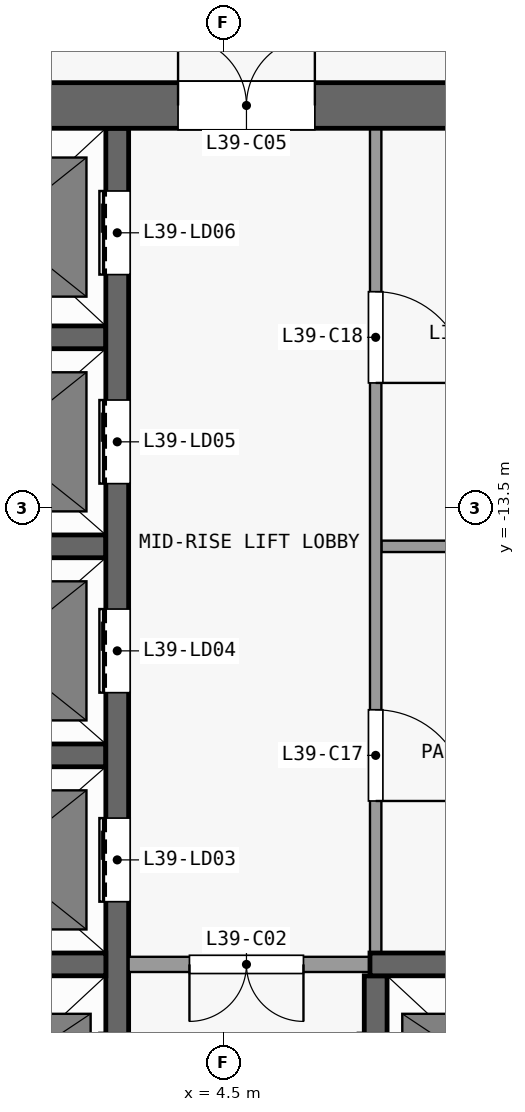
"""IFC4 building model, lengths in metres.
Left out: names, types, materials, properties, quantities, classifications, styles, units other than length and angle.
Written with IfcOpenShell. Run it as: python <this file> out.ifc"""

import sys

from ifc_helpers import new_model, si_unit, direction, frame, frame_2d, origin, place, context, subcontext, project, spatial, rectangle, extrude, element, fill, save


model = new_model("IFC4")
c1 = context("Model", 3, precision=1e-05, world=origin(), true_north=direction((0.0, 1.0)))
c2 = subcontext(c1, "Body", "Model", "MODEL_VIEW")
j1 = project(units=[si_unit("LENGTHUNIT", "METRE"), si_unit("PLANEANGLEUNIT", "RADIAN")], contexts=[c1])
p1 = place(None, origin())
s1 = spatial("IfcSite", under=j1, at=p1, CompositionType="ELEMENT")
p2 = place(p1, origin())
s2 = spatial("IfcBuilding", under=s1, at=p2, CompositionType="ELEMENT")
p3 = place(p2, frame((0.0, 0.0, 160.1)))
s3 = spatial("IfcBuildingStorey", under=s2, at=p3, CompositionType="ELEMENT", Elevation=160.1)
p4 = place(p3, frame((-13.3, -8.2, 0.0), z_axis=(0.0, 0.0, 1.0), x_axis=(1.0, 0.0, 0.0)))
e1 = element("IfcWall", 1, at=p4, inside=s3, PredefinedType="SHEAR", context=c2, shape_type="SweptSolid", body=[
    extrude(rectangle(XDim=26.6, YDim=0.6, at=frame_2d((13.3, 0.0))), origin(), (0.0, 0.0, 1.0), 3.3),
])
p5 = place(p4, frame((7.6, 0.0, 0.0)))
e2 = element("IfcOpeningElement", 2, at=p5, cuts=e1, PredefinedType="OPENING", context=c2, shape_type="SweptSolid", body=[
    extrude(rectangle(XDim=1.8, YDim=2.1, at=frame_2d((0.9, 1.05))), frame((0.0, 0.31, 0.0), z_axis=(0.0, -1.0, 0.0), x_axis=(1.0, 0.0, 0.0)), (0.0, 0.0, 1.0), 0.62),
])
p6 = place(p4, frame((17.2, 0.0, 0.0)))
e3 = element("IfcOpeningElement", 3, at=p6, cuts=e1, PredefinedType="OPENING", context=c2, shape_type="SweptSolid", body=[
    extrude(rectangle(XDim=1.8, YDim=2.1, at=frame_2d((0.9, 1.05))), frame((0.0, 0.31, 0.0), z_axis=(0.0, -1.0, 0.0), x_axis=(1.0, 0.0, 0.0)), (0.0, 0.0, 1.0), 0.62),
])
p7 = place(p4, frame((2.525, 0.0, 0.0)))
e4 = element("IfcOpeningElement", 4, at=p7, cuts=e1, PredefinedType="OPENING", context=c2, shape_type="SweptSolid", body=[
    extrude(rectangle(XDim=0.9, YDim=2.1, at=frame_2d((0.45, 1.05))), frame((0.0, 0.31, 0.0), z_axis=(0.0, -1.0, 0.0), x_axis=(1.0, 0.0, 0.0)), (0.0, 0.0, 1.0), 0.62),
])
p8 = place(p4, frame((23.875, 0.0, 0.0)))
e5 = element("IfcOpeningElement", 5, at=p8, cuts=e1, PredefinedType="OPENING", context=c2, shape_type="SweptSolid", body=[
    extrude(rectangle(XDim=1.2, YDim=2.1, at=frame_2d((0.6, 1.05))), frame((0.0, 0.31, 0.0), z_axis=(0.0, -1.0, 0.0), x_axis=(1.0, 0.0, 0.0)), (0.0, 0.0, 1.0), 0.62),
])
p9 = place(p3, frame((0.15, -19.5, 0.0), z_axis=(0.0, 0.0, 1.0), x_axis=(1.0, 0.0, 0.0)))
e6 = element("IfcWall", 6, at=p9, inside=s3, PredefinedType="SHEAR", context=c2, shape_type="SweptSolid", body=[
    extrude(rectangle(XDim=2.8, YDim=0.3, at=frame_2d((1.4, 0.0))), origin(), (0.0, 0.0, 1.0), 3.3),
])
p10 = place(p3, frame((6.575, -19.5, 0.0), z_axis=(0.0, 0.0, 1.0), x_axis=(-1.0, 0.0, 0.0)))
e7 = element("IfcWall", 7, at=p10, inside=s3, PredefinedType="PARTITIONING", context=c2, shape_type="SweptSolid", body=[
    extrude(rectangle(XDim=3.325, YDim=0.2, at=frame_2d((1.663, 0.0))), origin(), (0.0, 0.0, 1.0), 3.3),
])
p11 = place(p10, frame((1.025, 0.0, 0.0)))
e8 = element("IfcOpeningElement", 8, at=p11, cuts=e7, PredefinedType="OPENING", context=c2, shape_type="SweptSolid", body=[
    extrude(rectangle(XDim=1.5, YDim=2.1, at=frame_2d((0.75, 1.05))), frame((0.0, 0.11, 0.0), z_axis=(0.0, -1.0, 0.0), x_axis=(1.0, 0.0, 0.0)), (0.0, 0.0, 1.0), 0.22),
])
p12 = place(p3, frame((6.425, -19.5, 0.0), z_axis=(0.0, 0.0, 1.0), x_axis=(1.0, 0.0, 0.0)))
e9 = element("IfcWall", 9, at=p12, inside=s3, PredefinedType="SHEAR", context=c2, shape_type="SweptSolid", body=[
    extrude(rectangle(XDim=3.025, YDim=0.3, at=frame_2d((1.512, 0.0))), origin(), (0.0, 0.0, 1.0), 3.3),
])
for number, where, z_axis, x_axis in (
    (10, (0.15, -16.75, 0.0), (0.0, 0.0, 1.0), (1.0, 0.0, 0.0)),
    (11, (0.15, -14.0, 0.0), (0.0, 0.0, 1.0), (1.0, 0.0, 0.0)),
):
    element("IfcWall", number, at=place(p3, frame(where, z_axis=z_axis, x_axis=x_axis)), inside=s3, PredefinedType="SHEAR", context=c2, shape_type="SweptSolid", body=[
        extrude(rectangle(XDim=2.8, YDim=0.3, at=frame_2d((1.4, 0.0))), origin(), (0.0, 0.0, 1.0), 3.3),
    ])
p13 = place(p3, frame((6.575, -14.0, 0.0), z_axis=(0.0, 0.0, 1.0), x_axis=(1.0, 0.0, 0.0)))
e12 = element("IfcWall", 12, at=p13, inside=s3, PredefinedType="PARTITIONING", context=c2, shape_type="SweptSolid", body=[
    extrude(rectangle(XDim=2.925, YDim=0.15, at=frame_2d((1.462, 0.0))), origin(), (0.0, 0.0, 1.0), 3.3),
])
p14 = place(p3, frame((0.15, -11.25, 0.0), z_axis=(0.0, 0.0, 1.0), x_axis=(1.0, 0.0, 0.0)))
e13 = element("IfcWall", 13, at=p14, inside=s3, PredefinedType="SHEAR", context=c2, shape_type="SweptSolid", body=[
    extrude(rectangle(XDim=2.8, YDim=0.3, at=frame_2d((1.4, 0.0))), origin(), (0.0, 0.0, 1.0), 3.3),
])
p15 = place(p3, frame((3.1, -22.55, 0.0), z_axis=(0.0, 0.0, 1.0), x_axis=(0.0, 1.0, 0.0)))
e14 = element("IfcWall", 14, at=p15, inside=s3, PredefinedType="SHEAR", context=c2, shape_type="SweptSolid", body=[
    extrude(rectangle(XDim=14.05, YDim=0.3, at=frame_2d((7.025, 0.0))), origin(), (0.0, 0.0, 1.0), 3.3),
])
p16 = place(p15, frame((1.05, 0.0, 0.0)))
e15 = element("IfcOpeningElement", 15, at=p16, cuts=e14, PredefinedType="OPENING", context=c2, shape_type="SweptSolid", body=[
    extrude(rectangle(XDim=1.1, YDim=2.1, at=frame_2d((0.55, 1.05))), frame((0.0, 0.16, 0.0), z_axis=(0.0, -1.0, 0.0), x_axis=(1.0, 0.0, 0.0)), (0.0, 0.0, 1.0), 0.32),
])
p17 = place(p15, frame((3.875, 0.0, 0.0)))
e16 = element("IfcOpeningElement", 16, at=p17, cuts=e14, PredefinedType="OPENING", context=c2, shape_type="SweptSolid", body=[
    extrude(rectangle(XDim=1.1, YDim=2.1, at=frame_2d((0.55, 1.05))), frame((0.0, 0.16, 0.0), z_axis=(0.0, -1.0, 0.0), x_axis=(1.0, 0.0, 0.0)), (0.0, 0.0, 1.0), 0.32),
])
p18 = place(p15, frame((6.625, 0.0, 0.0)))
e17 = element("IfcOpeningElement", 17, at=p18, cuts=e14, PredefinedType="OPENING", context=c2, shape_type="SweptSolid", body=[
    extrude(rectangle(XDim=1.1, YDim=2.1, at=frame_2d((0.55, 1.05))), frame((0.0, 0.16, 0.0), z_axis=(0.0, -1.0, 0.0), x_axis=(1.0, 0.0, 0.0)), (0.0, 0.0, 1.0), 0.32),
])
p19 = place(p15, frame((9.375, 0.0, 0.0)))
e18 = element("IfcOpeningElement", 18, at=p19, cuts=e14, PredefinedType="OPENING", context=c2, shape_type="SweptSolid", body=[
    extrude(rectangle(XDim=1.1, YDim=2.1, at=frame_2d((0.55, 1.05))), frame((0.0, 0.16, 0.0), z_axis=(0.0, -1.0, 0.0), x_axis=(1.0, 0.0, 0.0)), (0.0, 0.0, 1.0), 0.32),
])
p20 = place(p15, frame((12.125, 0.0, 0.0)))
e19 = element("IfcOpeningElement", 19, at=p20, cuts=e14, PredefinedType="OPENING", context=c2, shape_type="SweptSolid", body=[
    extrude(rectangle(XDim=1.1, YDim=2.1, at=frame_2d((0.55, 1.05))), frame((0.0, 0.16, 0.0), z_axis=(0.0, -1.0, 0.0), x_axis=(1.0, 0.0, 0.0)), (0.0, 0.0, 1.0), 0.32),
])
p21 = place(p3, frame((6.5, -22.25, 0.0), z_axis=(0.0, 0.0, 1.0), x_axis=(0.0, 1.0, 0.0)))
e20 = element("IfcWall", 20, at=p21, inside=s3, PredefinedType="SHEAR", context=c2, shape_type="SweptSolid", body=[
    extrude(rectangle(XDim=2.6, YDim=0.3, at=frame_2d((1.3, 0.0))), origin(), (0.0, 0.0, 1.0), 3.3),
])
p22 = place(p21, frame((0.75, 0.0, 0.0)))
e21 = element("IfcOpeningElement", 21, at=p22, cuts=e20, PredefinedType="OPENING", context=c2, shape_type="SweptSolid", body=[
    extrude(rectangle(XDim=1.1, YDim=2.1, at=frame_2d((0.55, 1.05))), frame((0.0, 0.16, 0.0), z_axis=(0.0, -1.0, 0.0), x_axis=(1.0, 0.0, 0.0)), (0.0, 0.0, 1.0), 0.32),
])
p23 = place(p3, frame((6.5, -8.5, 0.0), z_axis=(0.0, 0.0, 1.0), x_axis=(0.0, -1.0, 0.0)))
e22 = element("IfcWall", 22, at=p23, inside=s3, PredefinedType="PARTITIONING", context=c2, shape_type="SweptSolid", body=[
    extrude(rectangle(XDim=10.85, YDim=0.15, at=frame_2d((5.425, 0.0))), origin(), (0.0, 0.0, 1.0), 3.3),
])
p24 = place(p23, frame((7.65, 0.0, 0.0)))
e23 = element("IfcOpeningElement", 23, at=p24, cuts=e22, PredefinedType="OPENING", context=c2, shape_type="SweptSolid", body=[
    extrude(rectangle(XDim=1.2, YDim=2.1, at=frame_2d((0.6, 1.05))), frame((0.0, 0.085, 0.0), z_axis=(0.0, -1.0, 0.0), x_axis=(1.0, 0.0, 0.0)), (0.0, 0.0, 1.0), 0.17),
])
p25 = place(p23, frame((2.15, 0.0, 0.0)))
e24 = element("IfcOpeningElement", 24, at=p25, cuts=e22, PredefinedType="OPENING", context=c2, shape_type="SweptSolid", body=[
    extrude(rectangle(XDim=1.2, YDim=2.1, at=frame_2d((0.6, 1.05))), frame((0.0, 0.085, 0.0), z_axis=(0.0, -1.0, 0.0), x_axis=(1.0, 0.0, 0.0)), (0.0, 0.0, 1.0), 0.17),
])
p26 = place(p17, origin())
e25 = element("IfcDoor", 25, at=p26, inside=s3, OperationType="DOUBLE_DOOR_SLIDING", PredefinedType="DOOR", context=c2, shape_type="SweptSolid", body=[
    extrude(rectangle(XDim=1.1, YDim=2.1, at=frame_2d((0.55, 1.05))), frame((0.0, 0.025, 0.0), z_axis=(0.0, -1.0, 0.0), x_axis=(1.0, 0.0, 0.0)), (0.0, 0.0, 1.0), 0.05),
])
fill(e16, e25)
p27 = place(p18, origin())
e26 = element("IfcDoor", 26, at=p27, inside=s3, OperationType="DOUBLE_DOOR_SLIDING", PredefinedType="DOOR", context=c2, shape_type="SweptSolid", body=[
    extrude(rectangle(XDim=1.1, YDim=2.1, at=frame_2d((0.55, 1.05))), frame((0.0, 0.025, 0.0), z_axis=(0.0, -1.0, 0.0), x_axis=(1.0, 0.0, 0.0)), (0.0, 0.0, 1.0), 0.05),
])
fill(e17, e26)
p28 = place(p19, origin())
e27 = element("IfcDoor", 27, at=p28, inside=s3, OperationType="DOUBLE_DOOR_SLIDING", PredefinedType="DOOR", context=c2, shape_type="SweptSolid", body=[
    extrude(rectangle(XDim=1.1, YDim=2.1, at=frame_2d((0.55, 1.05))), frame((0.0, 0.025, 0.0), z_axis=(0.0, -1.0, 0.0), x_axis=(1.0, 0.0, 0.0)), (0.0, 0.0, 1.0), 0.05),
])
fill(e18, e27)
p29 = place(p20, origin())
e28 = element("IfcDoor", 28, at=p29, inside=s3, OperationType="DOUBLE_DOOR_SLIDING", PredefinedType="DOOR", context=c2, shape_type="SweptSolid", body=[
    extrude(rectangle(XDim=1.1, YDim=2.1, at=frame_2d((0.55, 1.05))), frame((0.0, 0.025, 0.0), z_axis=(0.0, -1.0, 0.0), x_axis=(1.0, 0.0, 0.0)), (0.0, 0.0, 1.0), 0.05),
])
fill(e19, e28)
p30 = place(p11, origin())
e29 = element("IfcDoor", 29, at=p30, inside=s3, OperationType="DOUBLE_DOOR_SINGLE_SWING", PredefinedType="DOOR", context=c2, shape_type="SweptSolid", body=[
    extrude(rectangle(XDim=1.5, YDim=2.1, at=frame_2d((0.75, 1.05))), frame((0.0, 0.025, 0.0), z_axis=(0.0, -1.0, 0.0), x_axis=(1.0, 0.0, 0.0)), (0.0, 0.0, 1.0), 0.05),
])
fill(e8, e29)
p31 = place(p6, origin())
e30 = element("IfcDoor", 30, at=p31, inside=s3, OperationType="DOUBLE_DOOR_SINGLE_SWING", PredefinedType="DOOR", context=c2, shape_type="SweptSolid", body=[
    extrude(rectangle(XDim=1.8, YDim=2.1, at=frame_2d((0.9, 1.05))), frame((0.0, 0.025, 0.0), z_axis=(0.0, -1.0, 0.0), x_axis=(1.0, 0.0, 0.0)), (0.0, 0.0, 1.0), 0.05),
])
fill(e3, e30)
p32 = place(p24, origin())
e31 = element("IfcDoor", 31, at=p32, inside=s3, OperationType="SINGLE_SWING_RIGHT", PredefinedType="DOOR", context=c2, shape_type="SweptSolid", body=[
    extrude(rectangle(XDim=1.2, YDim=2.1, at=frame_2d((0.6, 1.05))), frame((0.0, 0.025, 0.0), z_axis=(0.0, -1.0, 0.0), x_axis=(1.0, 0.0, 0.0)), (0.0, 0.0, 1.0), 0.05),
])
fill(e23, e31)
p33 = place(p25, origin())
e32 = element("IfcDoor", 32, at=p33, inside=s3, OperationType="SINGLE_SWING_RIGHT", PredefinedType="DOOR", context=c2, shape_type="SweptSolid", body=[
    extrude(rectangle(XDim=1.2, YDim=2.1, at=frame_2d((0.6, 1.05))), frame((0.0, 0.025, 0.0), z_axis=(0.0, -1.0, 0.0), x_axis=(1.0, 0.0, 0.0)), (0.0, 0.0, 1.0), 0.05),
])
fill(e24, e32)
save(model, sys.argv[1])
